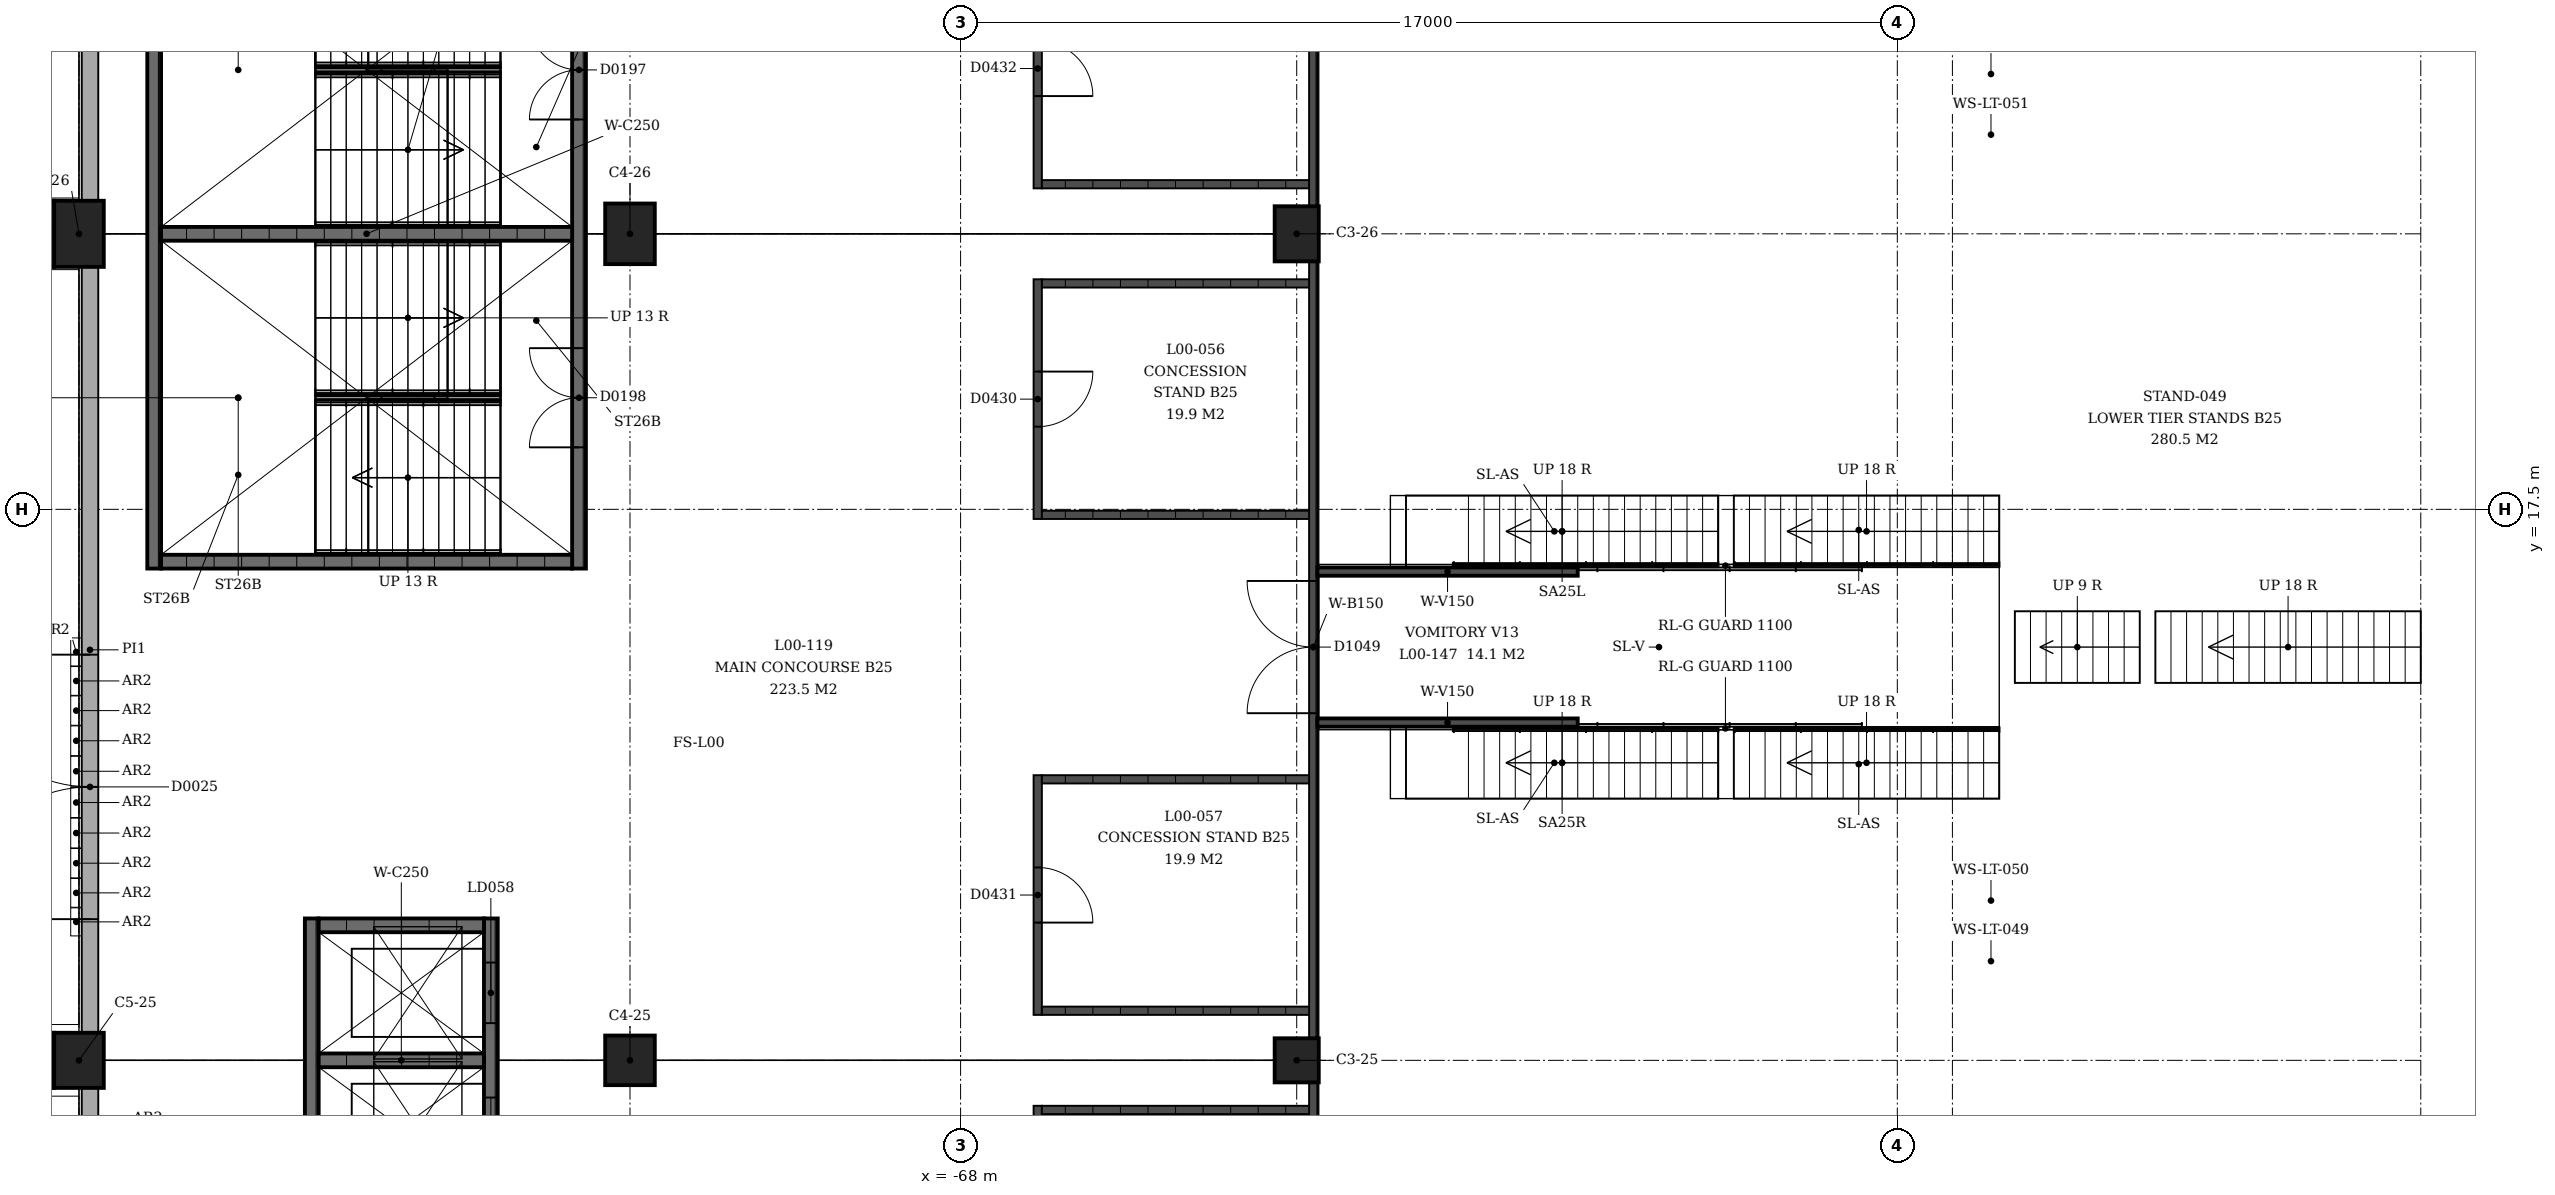
"""IFC4 building model, lengths in metres.
Left out: names, types, materials, properties, quantities, classifications, styles, units other than length and angle.
Written with IfcOpenShell. Run it as: python <this file> out.ifc"""

import sys

from ifc_helpers import new_model, si_unit, direction, frame, frame_2d, origin, origin_2d, place, context, subcontext, project, spatial, rectangle, extrude, element, fill, save


model = new_model("IFC4")
c1 = context("Model", 3, precision=1e-05, world=origin(), true_north=direction((0.0, 1.0)))
c2 = subcontext(c1, "Body", "Model", "MODEL_VIEW")
j1 = project(units=[si_unit("LENGTHUNIT", "METRE"), si_unit("PLANEANGLEUNIT", "RADIAN")], contexts=[c1])
p1 = place(None, origin())
s1 = spatial("IfcSite", under=j1, at=p1, CompositionType="ELEMENT")
p2 = place(p1, origin())
s2 = spatial("IfcBuilding", under=s1, at=p2, CompositionType="ELEMENT")
p3 = place(p2, origin())
s3 = spatial("IfcBuildingStorey", under=s2, at=p3, CompositionType="ELEMENT", Elevation=0.0)
p4 = place(p3, frame((-61.9, 7.5, 0.0), z_axis=(0.0, 0.0, 1.0), x_axis=(0.0, -1.0, 0.0)))
e1 = element("IfcColumn", 1, at=p4, inside=s3, PredefinedType="COLUMN", context=c2, shape_type="SweptSolid", body=[
    extrude(rectangle(XDim=0.8, YDim=0.8, at=origin_2d()), origin(), (0.0, 0.0, 1.0), 4.5),
])
p5 = place(p3, frame((-74.0, 7.5, 0.0), z_axis=(0.0, 0.0, 1.0), x_axis=(0.0, -1.0, 0.0)))
e2 = element("IfcColumn", 2, at=p5, inside=s3, PredefinedType="COLUMN", context=c2, shape_type="SweptSolid", body=[
    extrude(rectangle(XDim=0.9, YDim=0.9, at=origin_2d()), origin(), (0.0, 0.0, 1.0), 4.5),
])
p6 = place(p3, frame((-84.0, 7.5, 0.0), z_axis=(0.0, 0.0, 1.0), x_axis=(0.0, -1.0, 0.0)))
e3 = element("IfcColumn", 3, at=p6, inside=s3, PredefinedType="COLUMN", context=c2, shape_type="SweptSolid", body=[
    extrude(rectangle(XDim=1.0, YDim=0.9, at=origin_2d()), origin(), (0.0, 0.0, 1.0), 4.5),
])
p7 = place(p3, frame((-61.9, 22.5, 0.0), z_axis=(0.0, 0.0, 1.0), x_axis=(0.0, -1.0, 0.0)))
e4 = element("IfcColumn", 4, at=p7, inside=s3, PredefinedType="COLUMN", context=c2, shape_type="SweptSolid", body=[
    extrude(rectangle(XDim=1.0, YDim=0.8, at=origin_2d()), origin(), (0.0, 0.0, 1.0), 4.5),
])
p8 = place(p3, frame((-74.0, 22.5, 0.0), z_axis=(0.0, 0.0, 1.0), x_axis=(0.0, -1.0, 0.0)))
e5 = element("IfcColumn", 5, at=p8, inside=s3, PredefinedType="COLUMN", context=c2, shape_type="SweptSolid", body=[
    extrude(rectangle(XDim=1.1, YDim=0.9, at=origin_2d()), origin(), (0.0, 0.0, 1.0), 4.5),
])
p9 = place(p3, frame((-84.0, 22.5, 0.0), z_axis=(0.0, 0.0, 1.0), x_axis=(0.0, -1.0, 0.0)))
e6 = element("IfcColumn", 6, at=p9, inside=s3, PredefinedType="COLUMN", context=c2, shape_type="SweptSolid", body=[
    extrude(rectangle(XDim=1.2, YDim=0.9, at=origin_2d()), origin(), (0.0, 0.0, 1.0), 4.5),
])
p10 = place(p3, frame((-83.8, -6.9, 0.0), z_axis=(0.0, 0.0, 1.0), x_axis=(0.0, 1.0, 0.0)))
e7 = element("IfcWall", 7, at=p10, inside=s3, PredefinedType="SOLIDWALL", context=c2, shape_type="SweptSolid", body=[
    extrude(rectangle(XDim=13.9, YDim=0.3, at=frame_2d((6.95, 0.0))), origin(), (0.0, 0.0, 1.0), 3.09),
])
p11 = place(p10, frame((7.938, 0.0, 0.0)))
e8 = element("IfcOpeningElement", 8, at=p11, cuts=e7, PredefinedType="OPENING", context=c2, shape_type="SweptSolid", body=[
    extrude(rectangle(XDim=3.0, YDim=2.4, at=frame_2d((1.5, 1.2))), frame((0.0, 0.16, 0.0), z_axis=(0.0, -1.0, 0.0), x_axis=(1.0, 0.0, 0.0)), (0.0, 0.0, 1.0), 0.32),
])
p12 = place(p3, frame((-83.8, 8.0, 0.0), z_axis=(0.0, 0.0, 1.0), x_axis=(0.0, 1.0, 0.0)))
e9 = element("IfcWall", 9, at=p12, inside=s3, PredefinedType="SOLIDWALL", context=c2, shape_type="SweptSolid", body=[
    extrude(rectangle(XDim=13.9, YDim=0.3, at=frame_2d((6.95, 0.0))), origin(), (0.0, 0.0, 1.0), 3.09),
])
p13 = place(p12, frame((2.062, 0.0, 0.0)))
e10 = element("IfcOpeningElement", 10, at=p13, cuts=e9, PredefinedType="OPENING", context=c2, shape_type="SweptSolid", body=[
    extrude(rectangle(XDim=4.8, YDim=2.4, at=frame_2d((2.4, 1.2))), frame((0.0, 0.16, 0.0), z_axis=(0.0, -1.0, 0.0), x_axis=(1.0, 0.0, 0.0)), (0.0, 0.0, 1.0), 0.32),
])
p14 = place(p3, frame((-83.8, 23.1, 0.0), z_axis=(0.0, 0.0, 1.0), x_axis=(0.0, 1.0, 0.0)))
e11 = element("IfcWall", 11, at=p14, inside=s3, PredefinedType="SOLIDWALL", context=c2, shape_type="SweptSolid", body=[
    extrude(rectangle(XDim=13.9, YDim=0.3, at=frame_2d((6.95, 0.0))), origin(), (0.0, 0.0, 1.0), 3.09),
])
p15 = place(p14, frame((7.938, 0.0, 0.0)))
e12 = element("IfcOpeningElement", 12, at=p15, cuts=e11, PredefinedType="OPENING", context=c2, shape_type="SweptSolid", body=[
    extrude(rectangle(XDim=3.0, YDim=2.4, at=frame_2d((1.5, 1.2))), frame((0.0, 0.16, 0.0), z_axis=(0.0, -1.0, 0.0), x_axis=(1.0, 0.0, 0.0)), (0.0, 0.0, 1.0), 0.32),
])
p16 = place(p3, frame((-74.925, 28.575, 0.0), z_axis=(0.0, 0.0, 1.0), x_axis=(0.0, -1.0, 0.0)))
e13 = element("IfcWall", 13, at=p16, inside=s3, PredefinedType="SHEAR", context=c2, shape_type="SweptSolid", body=[
    extrude(rectangle(XDim=12.15, YDim=0.25, at=frame_2d((6.075, 0.0))), origin(), (0.0, 0.0, 1.0), 4.09),
])
p17 = place(p16, frame((2.2, 0.0, 0.0)))
e14 = element("IfcOpeningElement", 14, at=p17, cuts=e13, PredefinedType="OPENING", context=c2, shape_type="SweptSolid", body=[
    extrude(rectangle(XDim=1.8, YDim=2.1, at=frame_2d((0.9, 1.05))), frame((0.0, 0.125, 0.0), z_axis=(0.0, -1.0, 0.0), x_axis=(1.0, 0.0, 0.0)), (0.0, 0.0, 1.0), 0.25),
])
p18 = place(p16, frame((8.15, 0.0, 0.0)))
e15 = element("IfcOpeningElement", 15, at=p18, cuts=e13, PredefinedType="OPENING", context=c2, shape_type="SweptSolid", body=[
    extrude(rectangle(XDim=1.8, YDim=2.1, at=frame_2d((0.9, 1.05))), frame((0.0, 0.125, 0.0), z_axis=(0.0, -1.0, 0.0), x_axis=(1.0, 0.0, 0.0)), (0.0, 0.0, 1.0), 0.25),
])
p19 = place(p3, frame((-82.635, 28.575, 0.0), z_axis=(0.0, 0.0, 1.0), x_axis=(0.0, -1.0, 0.0)))
e16 = element("IfcWall", 16, at=p19, inside=s3, PredefinedType="SHEAR", context=c2, shape_type="SweptSolid", body=[
    extrude(rectangle(XDim=12.15, YDim=0.25, at=frame_2d((6.075, 0.0))), origin(), (0.0, 0.0, 1.0), 4.09),
])
for number, where, z_axis, x_axis in (
    (17, (-75.05, 16.55, 0.0), (0.0, 0.0, 1.0), (-1.0, 0.0, 0.0)),
    (18, (-75.05, 22.5, 0.0), (0.0, 0.0, 1.0), (-1.0, 0.0, 0.0)),
):
    element("IfcWall", number, at=place(p3, frame(where, z_axis=z_axis, x_axis=x_axis)), inside=s3, PredefinedType="SHEAR", context=c2, shape_type="SweptSolid", body=[
        extrude(rectangle(XDim=7.46, YDim=0.25, at=frame_2d((3.73, 0.0))), origin(), (0.0, 0.0, 1.0), 4.09),
    ])
p20 = place(p3, frame((-76.525, 10.075, 0.0), z_axis=(0.0, 0.0, 1.0), x_axis=(0.0, -1.0, 0.0)))
e19 = element("IfcWall", 19, at=p20, inside=s3, PredefinedType="SHEAR", context=c2, shape_type="SweptSolid", body=[
    extrude(rectangle(XDim=5.15, YDim=0.25, at=frame_2d((2.575, 0.0))), origin(), (0.0, 0.0, 1.0), 4.09),
])
p21 = place(p20, frame((0.8, 0.0, 0.0)))
e20 = element("IfcOpeningElement", 20, at=p21, cuts=e19, PredefinedType="OPENING", context=c2, shape_type="SweptSolid", body=[
    extrude(rectangle(XDim=1.1, YDim=2.1, at=frame_2d((0.55, 1.05))), frame((0.0, 0.125, 0.0), z_axis=(0.0, -1.0, 0.0), x_axis=(1.0, 0.0, 0.0)), (0.0, 0.0, 1.0), 0.25),
])
p22 = place(p20, frame((3.25, 0.0, 0.0)))
e21 = element("IfcOpeningElement", 21, at=p22, cuts=e19, PredefinedType="OPENING", context=c2, shape_type="SweptSolid", body=[
    extrude(rectangle(XDim=1.1, YDim=2.1, at=frame_2d((0.55, 1.05))), frame((0.0, 0.125, 0.0), z_axis=(0.0, -1.0, 0.0), x_axis=(1.0, 0.0, 0.0)), (0.0, 0.0, 1.0), 0.25),
])
p23 = place(p3, frame((-79.775, 10.075, 0.0), z_axis=(0.0, 0.0, 1.0), x_axis=(0.0, -1.0, 0.0)))
e22 = element("IfcWall", 22, at=p23, inside=s3, PredefinedType="SHEAR", context=c2, shape_type="SweptSolid", body=[
    extrude(rectangle(XDim=5.15, YDim=0.25, at=frame_2d((2.575, 0.0))), origin(), (0.0, 0.0, 1.0), 4.09),
])
for number, where, z_axis, x_axis in (
    (23, (-76.65, 9.95, 0.0), (0.0, 0.0, 1.0), (-1.0, 0.0, 0.0)),
    (24, (-76.65, 7.5, 0.0), (0.0, 0.0, 1.0), (-1.0, 0.0, 0.0)),
):
    element("IfcWall", number, at=place(p3, frame(where, z_axis=z_axis, x_axis=x_axis)), inside=s3, PredefinedType="SHEAR", context=c2, shape_type="SweptSolid", body=[
        extrude(rectangle(XDim=3.0, YDim=0.25, at=frame_2d((1.5, 0.0))), origin(), (0.0, 0.0, 1.0), 4.09),
    ])
p24 = place(p3, frame((-66.6, 2.325, 0.0), z_axis=(0.0, 0.0, 1.0), x_axis=(0.0, 1.0, 0.0)))
e25 = element("IfcWall", 25, at=p24, inside=s3, PredefinedType="SOLIDWALL", context=c2, shape_type="SweptSolid", body=[
    extrude(rectangle(XDim=4.35, YDim=0.15, at=frame_2d((2.175, 0.0))), origin(), (0.0, 0.0, 1.0), 3.0),
])
p25 = place(p24, frame((1.675, 0.0, 0.0)))
e26 = element("IfcOpeningElement", 26, at=p25, cuts=e25, PredefinedType="OPENING", context=c2, shape_type="SweptSolid", body=[
    extrude(rectangle(XDim=1.0, YDim=2.1, at=frame_2d((0.5, 1.05))), frame((0.0, 0.075, 0.0), z_axis=(0.0, -1.0, 0.0), x_axis=(1.0, 0.0, 0.0)), (0.0, 0.0, 1.0), 0.15),
])
p26 = place(p3, frame((-61.6, 6.6, 0.0), z_axis=(0.0, 0.0, 1.0), x_axis=(-1.0, 0.0, 0.0)))
e27 = element("IfcWall", 27, at=p26, inside=s3, PredefinedType="SOLIDWALL", context=c2, shape_type="SweptSolid", body=[
    extrude(rectangle(XDim=4.925, YDim=0.15, at=frame_2d((2.462, 0.0))), origin(), (0.0, 0.0, 1.0), 3.0),
])
p27 = place(p3, frame((-66.6, 21.675, 0.0), z_axis=(0.0, 0.0, 1.0), x_axis=(0.0, -1.0, 0.0)))
e28 = element("IfcWall", 28, at=p27, inside=s3, PredefinedType="SOLIDWALL", context=c2, shape_type="SweptSolid", body=[
    extrude(rectangle(XDim=4.35, YDim=0.15, at=frame_2d((2.175, 0.0))), origin(), (0.0, 0.0, 1.0), 3.0),
])
p28 = place(p27, frame((1.675, 0.0, 0.0)))
e29 = element("IfcOpeningElement", 29, at=p28, cuts=e28, PredefinedType="OPENING", context=c2, shape_type="SweptSolid", body=[
    extrude(rectangle(XDim=1.0, YDim=2.1, at=frame_2d((0.5, 1.05))), frame((0.0, 0.075, 0.0), z_axis=(0.0, -1.0, 0.0), x_axis=(1.0, 0.0, 0.0)), (0.0, 0.0, 1.0), 0.15),
])
for number, where, z_axis, x_axis in (
    (30, (-61.6, 21.6, 0.0), (0.0, 0.0, 1.0), (-1.0, 0.0, 0.0)),
    (31, (-61.6, 17.4, 0.0), (0.0, 0.0, 1.0), (-1.0, 0.0, 0.0)),
):
    element("IfcWall", number, at=place(p3, frame(where, z_axis=z_axis, x_axis=x_axis)), inside=s3, PredefinedType="SOLIDWALL", context=c2, shape_type="SweptSolid", body=[
        extrude(rectangle(XDim=4.925, YDim=0.15, at=frame_2d((2.462, 0.0))), origin(), (0.0, 0.0, 1.0), 3.0),
    ])
p29 = place(p3, frame((-66.6, 12.675, 0.0), z_axis=(0.0, 0.0, 1.0), x_axis=(0.0, -1.0, 0.0)))
e32 = element("IfcWall", 32, at=p29, inside=s3, PredefinedType="SOLIDWALL", context=c2, shape_type="SweptSolid", body=[
    extrude(rectangle(XDim=4.35, YDim=0.15, at=frame_2d((2.175, 0.0))), origin(), (0.0, 0.0, 1.0), 3.0),
])
p30 = place(p29, frame((1.675, 0.0, 0.0)))
e33 = element("IfcOpeningElement", 33, at=p30, cuts=e32, PredefinedType="OPENING", context=c2, shape_type="SweptSolid", body=[
    extrude(rectangle(XDim=1.0, YDim=2.1, at=frame_2d((0.5, 1.05))), frame((0.0, 0.075, 0.0), z_axis=(0.0, -1.0, 0.0), x_axis=(1.0, 0.0, 0.0)), (0.0, 0.0, 1.0), 0.15),
])
for number, where, z_axis, x_axis in (
    (34, (-61.6, 12.6, 0.0), (0.0, 0.0, 1.0), (-1.0, 0.0, 0.0)),
    (35, (-61.6, 8.4, 0.0), (0.0, 0.0, 1.0), (-1.0, 0.0, 0.0)),
):
    element("IfcWall", number, at=place(p3, frame(where, z_axis=z_axis, x_axis=x_axis)), inside=s3, PredefinedType="SOLIDWALL", context=c2, shape_type="SweptSolid", body=[
        extrude(rectangle(XDim=4.925, YDim=0.15, at=frame_2d((2.462, 0.0))), origin(), (0.0, 0.0, 1.0), 3.0),
    ])
p31 = place(p3, frame((-66.6, 23.325, 0.0), z_axis=(0.0, 0.0, 1.0), x_axis=(0.0, 1.0, 0.0)))
e36 = element("IfcWall", 36, at=p31, inside=s3, PredefinedType="SOLIDWALL", context=c2, shape_type="SweptSolid", body=[
    extrude(rectangle(XDim=4.35, YDim=0.15, at=frame_2d((2.175, 0.0))), origin(), (0.0, 0.0, 1.0), 3.0),
])
p32 = place(p31, frame((1.675, 0.0, 0.0)))
e37 = element("IfcOpeningElement", 37, at=p32, cuts=e36, PredefinedType="OPENING", context=c2, shape_type="SweptSolid", body=[
    extrude(rectangle(XDim=1.0, YDim=2.1, at=frame_2d((0.5, 1.05))), frame((0.0, 0.075, 0.0), z_axis=(0.0, -1.0, 0.0), x_axis=(1.0, 0.0, 0.0)), (0.0, 0.0, 1.0), 0.15),
])
p33 = place(p3, frame((-61.6, 23.4, 0.0), z_axis=(0.0, 0.0, 1.0), x_axis=(-1.0, 0.0, 0.0)))
e38 = element("IfcWall", 38, at=p33, inside=s3, PredefinedType="SOLIDWALL", context=c2, shape_type="SweptSolid", body=[
    extrude(rectangle(XDim=4.925, YDim=0.15, at=frame_2d((2.462, 0.0))), origin(), (0.0, 0.0, 1.0), 3.0),
])
p34 = place(p3, frame((-61.6, -7.0, 0.0), z_axis=(0.0, 0.0, 1.0), x_axis=(0.0, 1.0, 0.0)))
e39 = element("IfcWall", 39, at=p34, inside=s3, PredefinedType="SOLIDWALL", context=c2, shape_type="SweptSolid", body=[
    extrude(rectangle(XDim=14.1, YDim=0.15, at=frame_2d((7.05, 0.0))), origin(), (0.0, 0.0, 1.0), 3.0),
])
p35 = place(p3, frame((-61.6, 7.9, 0.0), z_axis=(0.0, 0.0, 1.0), x_axis=(0.0, 1.0, 0.0)))
e40 = element("IfcWall", 40, at=p35, inside=s3, PredefinedType="SOLIDWALL", context=c2, shape_type="SweptSolid", body=[
    extrude(rectangle(XDim=14.1, YDim=0.15, at=frame_2d((7.05, 0.0))), origin(), (0.0, 0.0, 1.0), 3.0),
])
p36 = place(p35, frame((5.9, 0.0, 0.0)))
e41 = element("IfcOpeningElement", 41, at=p36, cuts=e40, PredefinedType="OPENING", context=c2, shape_type="SweptSolid", body=[
    extrude(rectangle(XDim=2.4, YDim=2.4, at=frame_2d((1.2, 1.2))), frame((0.0, 0.075, 0.0), z_axis=(0.0, -1.0, 0.0), x_axis=(1.0, 0.0, 0.0)), (0.0, 0.0, 1.0), 0.15),
])
p37 = place(p3, frame((-61.6, 23.0, 0.0), z_axis=(0.0, 0.0, 1.0), x_axis=(0.0, 1.0, 0.0)))
e42 = element("IfcWall", 42, at=p37, inside=s3, PredefinedType="SOLIDWALL", context=c2, shape_type="SweptSolid", body=[
    extrude(rectangle(XDim=14.1, YDim=0.15, at=frame_2d((7.05, 0.0))), origin(), (0.0, 0.0, 1.0), 3.0),
])
for number, where, z_axis, x_axis in (
    (43, (-56.8, 16.37, 0.0), (0.0, 0.0, 1.0), (-1.0, 0.0, 0.0)),
    (44, (-56.8, 13.63, 0.0), (0.0, 0.0, 1.0), (-1.0, 0.0, 0.0)),
):
    element("IfcWall", number, at=place(p3, frame(where, z_axis=z_axis, x_axis=x_axis)), inside=s3, PredefinedType="SOLIDWALL", context=c2, shape_type="SweptSolid", body=[
        extrude(rectangle(XDim=4.725, YDim=0.15, at=frame_2d((2.362, 0.0))), origin(), (0.0, 0.0, 1.0), 2.75),
    ])
p38 = place(p13, origin())
e45 = element("IfcDoor", 45, at=p38, inside=s3, OperationType="DOUBLE_DOOR_SINGLE_SWING", PredefinedType="DOOR", context=c2, shape_type="SweptSolid", body=[
    extrude(rectangle(XDim=4.8, YDim=2.4, at=frame_2d((2.4, 1.2))), frame((0.0, 0.025, 0.0), z_axis=(0.0, -1.0, 0.0), x_axis=(1.0, 0.0, 0.0)), (0.0, 0.0, 1.0), 0.05),
])
fill(e10, e45)
p39 = place(p17, origin())
e46 = element("IfcDoor", 46, at=p39, inside=s3, OperationType="DOUBLE_DOOR_SINGLE_SWING", PredefinedType="DOOR", context=c2, shape_type="SweptSolid", body=[
    extrude(rectangle(XDim=1.8, YDim=2.1, at=frame_2d((0.9, 1.05))), frame((0.0, 0.025, 0.0), z_axis=(0.0, -1.0, 0.0), x_axis=(1.0, 0.0, 0.0)), (0.0, 0.0, 1.0), 0.05),
])
fill(e14, e46)
p40 = place(p18, origin())
e47 = element("IfcDoor", 47, at=p40, inside=s3, OperationType="DOUBLE_DOOR_SINGLE_SWING", PredefinedType="DOOR", context=c2, shape_type="SweptSolid", body=[
    extrude(rectangle(XDim=1.8, YDim=2.1, at=frame_2d((0.9, 1.05))), frame((0.0, 0.025, 0.0), z_axis=(0.0, -1.0, 0.0), x_axis=(1.0, 0.0, 0.0)), (0.0, 0.0, 1.0), 0.05),
])
fill(e15, e47)
p41 = place(p21, origin())
e48 = element("IfcDoor", 48, at=p41, inside=s3, OperationType="SLIDING_TO_LEFT", PredefinedType="DOOR", context=c2, shape_type="SweptSolid", body=[
    extrude(rectangle(XDim=1.1, YDim=2.1, at=frame_2d((0.55, 1.05))), frame((0.0, 0.025, 0.0), z_axis=(0.0, -1.0, 0.0), x_axis=(1.0, 0.0, 0.0)), (0.0, 0.0, 1.0), 0.05),
])
fill(e20, e48)
p42 = place(p22, origin())
e49 = element("IfcDoor", 49, at=p42, inside=s3, OperationType="SLIDING_TO_LEFT", PredefinedType="DOOR", context=c2, shape_type="SweptSolid", body=[
    extrude(rectangle(XDim=1.1, YDim=2.1, at=frame_2d((0.55, 1.05))), frame((0.0, 0.025, 0.0), z_axis=(0.0, -1.0, 0.0), x_axis=(1.0, 0.0, 0.0)), (0.0, 0.0, 1.0), 0.05),
])
fill(e21, e49)
p43 = place(p28, origin())
e50 = element("IfcDoor", 50, at=p43, inside=s3, OperationType="SINGLE_SWING_RIGHT", PredefinedType="DOOR", context=c2, shape_type="SweptSolid", body=[
    extrude(rectangle(XDim=1.0, YDim=2.1, at=frame_2d((0.5, 1.05))), frame((0.0, 0.025, 0.0), z_axis=(0.0, -1.0, 0.0), x_axis=(1.0, 0.0, 0.0)), (0.0, 0.0, 1.0), 0.05),
])
fill(e29, e50)
p44 = place(p30, origin())
e51 = element("IfcDoor", 51, at=p44, inside=s3, OperationType="SINGLE_SWING_LEFT", PredefinedType="DOOR", context=c2, shape_type="SweptSolid", body=[
    extrude(rectangle(XDim=1.0, YDim=2.1, at=frame_2d((0.5, 1.05))), frame((0.0, 0.025, 0.0), z_axis=(0.0, -1.0, 0.0), x_axis=(1.0, 0.0, 0.0)), (0.0, 0.0, 1.0), 0.05),
])
fill(e33, e51)
p45 = place(p32, origin())
e52 = element("IfcDoor", 52, at=p45, inside=s3, OperationType="SINGLE_SWING_LEFT", PredefinedType="DOOR", context=c2, shape_type="SweptSolid", body=[
    extrude(rectangle(XDim=1.0, YDim=2.1, at=frame_2d((0.5, 1.05))), frame((0.0, 0.025, 0.0), z_axis=(0.0, -1.0, 0.0), x_axis=(1.0, 0.0, 0.0)), (0.0, 0.0, 1.0), 0.05),
])
fill(e37, e52)
p46 = place(p36, origin())
e53 = element("IfcDoor", 53, at=p46, inside=s3, OperationType="DOUBLE_DOOR_SINGLE_SWING", PredefinedType="DOOR", context=c2, shape_type="SweptSolid", body=[
    extrude(rectangle(XDim=2.4, YDim=2.4, at=frame_2d((1.2, 1.2))), frame((0.0, 0.025, 0.0), z_axis=(0.0, -1.0, 0.0), x_axis=(1.0, 0.0, 0.0)), (0.0, 0.0, 1.0), 0.05),
])
fill(e41, e53)
save(model, sys.argv[1])
